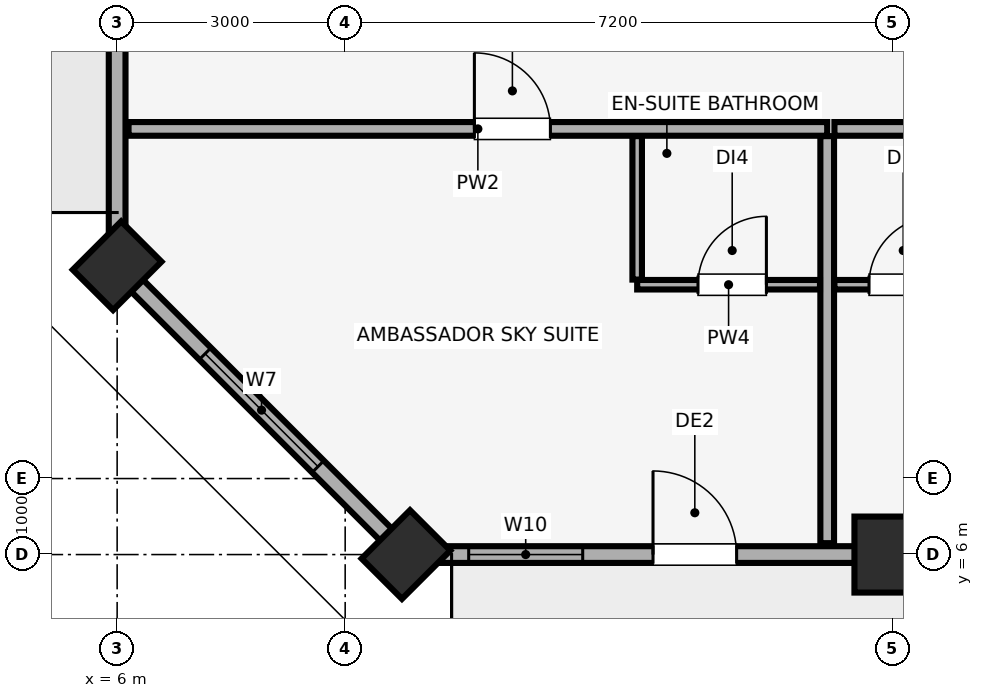
"""IFC4 building model, lengths in metres.
Left out: names, types, materials, properties, quantities, classifications, styles, units other than length and angle.
Written with IfcOpenShell. Run it as: python <this file> out.ifc"""

import sys

from ifc_helpers import new_model, si_unit, direction, frame, frame_2d, origin, origin_2d, place, context, subcontext, project, spatial, rectangle, extrude, element, fill, save


model = new_model("IFC4")
c1 = context("Model", 3, precision=1e-05, world=origin(), true_north=direction((0.0, 1.0)))
c2 = subcontext(c1, "Body", "Model", "MODEL_VIEW")
j1 = project(units=[si_unit("LENGTHUNIT", "METRE"), si_unit("PLANEANGLEUNIT", "RADIAN")], contexts=[c1])
p1 = place(None, origin())
s1 = spatial("IfcSite", under=j1, at=p1, CompositionType="ELEMENT")
p2 = place(p1, origin())
s2 = spatial("IfcBuilding", under=s1, at=p2, CompositionType="ELEMENT")
p3 = place(p2, frame((0.0, 0.0, 229.15)))
s3 = spatial("IfcBuildingStorey", under=s2, at=p3, CompositionType="ELEMENT", Elevation=229.15)
p4 = place(p3, frame((16.2, 6.0, 0.0), z_axis=(0.0, 0.0, 1.0), x_axis=(1.0, 0.0, 0.0)))
e1 = element("IfcColumn", 1, at=p4, inside=s3, PredefinedType="COLUMN", context=c2, shape_type="SweptSolid", body=[
    extrude(rectangle(XDim=1.0, YDim=1.0, at=origin_2d()), origin(), (0.0, 0.0, 1.0), 3.71),
])
for number, where, z_axis, x_axis in (
    (2, (9.8, 6.0, 0.0), (0.0, 0.0, 1.0), (0.707, 0.707, 0.0)),
    (3, (6.0, 9.8, 0.0), (0.0, 0.0, 1.0), (0.707, 0.707, 0.0)),
):
    element("IfcColumn", number, at=place(p3, frame(where, z_axis=z_axis, x_axis=x_axis)), inside=s3, PredefinedType="PILASTER", context=c2, shape_type="SweptSolid", body=[
        extrude(rectangle(XDim=0.9, YDim=0.75, at=origin_2d()), origin(), (0.0, 0.0, 1.0), 3.71),
    ])
p5 = place(p3, frame((9.8, 6.0, 0.0), z_axis=(0.0, 0.0, 1.0), x_axis=(1.0, 0.0, 0.0)))
e4 = element("IfcWall", 4, at=p5, inside=s3, PredefinedType="SOLIDWALL", context=c2, shape_type="SweptSolid", body=[
    extrude(rectangle(XDim=64.4, YDim=0.22, at=frame_2d((32.2, 0.0))), origin(), (0.0, 0.0, 1.0), 2.91),
])
p6 = place(p5, frame((3.25, 0.0, 0.0)))
e5 = element("IfcOpeningElement", 5, at=p6, cuts=e4, PredefinedType="OPENING", context=c2, shape_type="SweptSolid", body=[
    extrude(rectangle(XDim=1.1, YDim=2.15, at=frame_2d((0.55, 1.075))), frame((0.0, 0.12, 0.0), z_axis=(0.0, -1.0, 0.0), x_axis=(1.0, 0.0, 0.0)), (0.0, 0.0, 1.0), 0.24),
])
p7 = place(p5, frame((24.45, 0.0, 0.0)))
e6 = element("IfcOpeningElement", 6, at=p7, cuts=e4, PredefinedType="OPENING", context=c2, shape_type="SweptSolid", body=[
    extrude(rectangle(XDim=1.1, YDim=2.15, at=frame_2d((0.55, 1.075))), frame((0.0, 0.12, 0.0), z_axis=(0.0, -1.0, 0.0), x_axis=(1.0, 0.0, 0.0)), (0.0, 0.0, 1.0), 0.24),
])
p8 = place(p5, frame((45.65, 0.0, 0.0)))
e7 = element("IfcOpeningElement", 7, at=p8, cuts=e4, PredefinedType="OPENING", context=c2, shape_type="SweptSolid", body=[
    extrude(rectangle(XDim=1.1, YDim=2.15, at=frame_2d((0.55, 1.075))), frame((0.0, 0.12, 0.0), z_axis=(0.0, -1.0, 0.0), x_axis=(1.0, 0.0, 0.0)), (0.0, 0.0, 1.0), 0.24),
])
p9 = place(p5, frame((0.825, 0.0, 0.85)))
e8 = element("IfcOpeningElement", 8, at=p9, cuts=e4, PredefinedType="OPENING", context=c2, shape_type="SweptSolid", body=[
    extrude(rectangle(XDim=1.5, YDim=1.4, at=frame_2d((0.75, 0.7))), frame((0.0, 0.12, 0.0), z_axis=(0.0, -1.0, 0.0), x_axis=(1.0, 0.0, 0.0)), (0.0, 0.0, 1.0), 0.24),
])
p10 = place(p5, frame((7.217, 0.0, 0.85)))
e9 = element("IfcOpeningElement", 9, at=p10, cuts=e4, PredefinedType="OPENING", context=c2, shape_type="SweptSolid", body=[
    extrude(rectangle(XDim=3.2, YDim=1.85, at=frame_2d((1.6, 0.925))), frame((0.0, 0.12, 0.0), z_axis=(0.0, -1.0, 0.0), x_axis=(1.0, 0.0, 0.0)), (0.0, 0.0, 1.0), 0.24),
])
p11 = place(p5, frame((11.267, 0.0, 0.85)))
e10 = element("IfcOpeningElement", 10, at=p11, cuts=e4, PredefinedType="OPENING", context=c2, shape_type="SweptSolid", body=[
    extrude(rectangle(XDim=1.5, YDim=1.4, at=frame_2d((0.75, 0.7))), frame((0.0, 0.12, 0.0), z_axis=(0.0, -1.0, 0.0), x_axis=(1.0, 0.0, 0.0)), (0.0, 0.0, 1.0), 0.24),
])
p12 = place(p5, frame((16.663, 0.0, 0.85)))
e11 = element("IfcOpeningElement", 11, at=p12, cuts=e4, PredefinedType="OPENING", context=c2, shape_type="SweptSolid", body=[
    extrude(rectangle(XDim=3.2, YDim=1.85, at=frame_2d((1.6, 0.925))), frame((0.0, 0.12, 0.0), z_axis=(0.0, -1.0, 0.0), x_axis=(1.0, 0.0, 0.0)), (0.0, 0.0, 1.0), 0.24),
])
p13 = place(p5, frame((22.098, 0.0, 0.85)))
e12 = element("IfcOpeningElement", 12, at=p13, cuts=e4, PredefinedType="OPENING", context=c2, shape_type="SweptSolid", body=[
    extrude(rectangle(XDim=1.5, YDim=1.4, at=frame_2d((0.75, 0.7))), frame((0.0, 0.12, 0.0), z_axis=(0.0, -1.0, 0.0), x_axis=(1.0, 0.0, 0.0)), (0.0, 0.0, 1.0), 0.24),
])
p14 = place(p5, frame((29.0, 0.0, 0.85)))
e13 = element("IfcOpeningElement", 13, at=p14, cuts=e4, PredefinedType="OPENING", context=c2, shape_type="SweptSolid", body=[
    extrude(rectangle(XDim=2.4, YDim=1.5, at=frame_2d((1.2, 0.75))), frame((0.0, 0.12, 0.0), z_axis=(0.0, -1.0, 0.0), x_axis=(1.0, 0.0, 0.0)), (0.0, 0.0, 1.0), 0.24),
])
p15 = place(p5, frame((32.4, 0.0, 0.85)))
e14 = element("IfcOpeningElement", 14, at=p15, cuts=e4, PredefinedType="OPENING", context=c2, shape_type="SweptSolid", body=[
    extrude(rectangle(XDim=3.2, YDim=1.85, at=frame_2d((1.6, 0.925))), frame((0.0, 0.12, 0.0), z_axis=(0.0, -1.0, 0.0), x_axis=(1.0, 0.0, 0.0)), (0.0, 0.0, 1.0), 0.24),
])
p16 = place(p5, frame((38.138, 0.0, 0.85)))
e15 = element("IfcOpeningElement", 15, at=p16, cuts=e4, PredefinedType="OPENING", context=c2, shape_type="SweptSolid", body=[
    extrude(rectangle(XDim=3.6, YDim=1.75, at=frame_2d((1.8, 0.875))), frame((0.0, 0.12, 0.0), z_axis=(0.0, -1.0, 0.0), x_axis=(1.0, 0.0, 0.0)), (0.0, 0.0, 1.0), 0.24),
])
p17 = place(p5, frame((48.387, 0.0, 0.85)))
e16 = element("IfcOpeningElement", 16, at=p17, cuts=e4, PredefinedType="OPENING", context=c2, shape_type="SweptSolid", body=[
    extrude(rectangle(XDim=1.5, YDim=1.4, at=frame_2d((0.75, 0.7))), frame((0.0, 0.12, 0.0), z_axis=(0.0, -1.0, 0.0), x_axis=(1.0, 0.0, 0.0)), (0.0, 0.0, 1.0), 0.24),
])
p18 = place(p5, frame((53.583, 0.0, 0.85)))
e17 = element("IfcOpeningElement", 17, at=p18, cuts=e4, PredefinedType="OPENING", context=c2, shape_type="SweptSolid", body=[
    extrude(rectangle(XDim=3.6, YDim=1.75, at=frame_2d((1.8, 0.875))), frame((0.0, 0.12, 0.0), z_axis=(0.0, -1.0, 0.0), x_axis=(1.0, 0.0, 0.0)), (0.0, 0.0, 1.0), 0.24),
])
p19 = place(p5, frame((59.695, 0.0, 0.85)))
e18 = element("IfcOpeningElement", 18, at=p19, cuts=e4, PredefinedType="OPENING", context=c2, shape_type="SweptSolid", body=[
    extrude(rectangle(XDim=3.6, YDim=1.75, at=frame_2d((1.8, 0.875))), frame((0.0, 0.12, 0.0), z_axis=(0.0, -1.0, 0.0), x_axis=(1.0, 0.0, 0.0)), (0.0, 0.0, 1.0), 0.24),
])
p20 = place(p3, frame((6.0, 45.2, 0.0), z_axis=(0.0, 0.0, 1.0), x_axis=(0.0, -1.0, 0.0)))
e19 = element("IfcWall", 19, at=p20, inside=s3, PredefinedType="SOLIDWALL", context=c2, shape_type="SweptSolid", body=[
    extrude(rectangle(XDim=35.4, YDim=0.22, at=frame_2d((17.7, 0.0))), origin(), (0.0, 0.0, 1.0), 2.91),
])
p21 = place(p20, frame((22.3, 0.0, 0.0)))
e20 = element("IfcOpeningElement", 20, at=p21, cuts=e19, PredefinedType="OPENING", context=c2, shape_type="SweptSolid", body=[
    extrude(rectangle(XDim=1.4, YDim=2.2, at=frame_2d((0.7, 1.1))), frame((0.0, 0.12, 0.0), z_axis=(0.0, -1.0, 0.0), x_axis=(1.0, 0.0, 0.0)), (0.0, 0.0, 1.0), 0.24),
])
p22 = place(p20, frame((25.06, 0.0, 0.85)))
e21 = element("IfcOpeningElement", 21, at=p22, cuts=e19, PredefinedType="OPENING", context=c2, shape_type="SweptSolid", body=[
    extrude(rectangle(XDim=3.6, YDim=1.65, at=frame_2d((1.8, 0.825))), frame((0.0, 0.12, 0.0), z_axis=(0.0, -1.0, 0.0), x_axis=(1.0, 0.0, 0.0)), (0.0, 0.0, 1.0), 0.24),
])
p23 = place(p20, frame((17.34, 0.0, 0.85)))
e22 = element("IfcOpeningElement", 22, at=p23, cuts=e19, PredefinedType="OPENING", context=c2, shape_type="SweptSolid", body=[
    extrude(rectangle(XDim=3.6, YDim=1.65, at=frame_2d((1.8, 0.825))), frame((0.0, 0.12, 0.0), z_axis=(0.0, -1.0, 0.0), x_axis=(1.0, 0.0, 0.0)), (0.0, 0.0, 1.0), 0.24),
])
p24 = place(p20, frame((11.585, 0.0, 0.85)))
e23 = element("IfcOpeningElement", 23, at=p24, cuts=e19, PredefinedType="OPENING", context=c2, shape_type="SweptSolid", body=[
    extrude(rectangle(XDim=3.0, YDim=1.5, at=frame_2d((1.5, 0.75))), frame((0.0, 0.12, 0.0), z_axis=(0.0, -1.0, 0.0), x_axis=(1.0, 0.0, 0.0)), (0.0, 0.0, 1.0), 0.24),
])
p25 = place(p20, frame((6.815, 0.0, 0.85)))
e24 = element("IfcOpeningElement", 24, at=p25, cuts=e19, PredefinedType="OPENING", context=c2, shape_type="SweptSolid", body=[
    extrude(rectangle(XDim=3.0, YDim=1.5, at=frame_2d((1.5, 0.75))), frame((0.0, 0.12, 0.0), z_axis=(0.0, -1.0, 0.0), x_axis=(1.0, 0.0, 0.0)), (0.0, 0.0, 1.0), 0.24),
])
p26 = place(p20, frame((0.885, 0.0, 0.85)))
e25 = element("IfcOpeningElement", 25, at=p26, cuts=e19, PredefinedType="OPENING", context=c2, shape_type="SweptSolid", body=[
    extrude(rectangle(XDim=3.6, YDim=1.65, at=frame_2d((1.8, 0.825))), frame((0.0, 0.12, 0.0), z_axis=(0.0, -1.0, 0.0), x_axis=(1.0, 0.0, 0.0)), (0.0, 0.0, 1.0), 0.24),
])
p27 = place(p3, frame((6.0, 9.8, 0.0), z_axis=(0.0, 0.0, 1.0), x_axis=(0.707106781187, -0.707106781187, 0.0)))
e26 = element("IfcWall", 26, at=p27, inside=s3, PredefinedType="SOLIDWALL", context=c2, shape_type="SweptSolid", body=[
    extrude(rectangle(XDim=5.374, YDim=0.22, at=frame_2d((2.687, 0.0))), origin(), (0.0, 0.0, 1.0), 2.91),
])
p28 = place(p27, frame((1.637, 0.0, 0.85)))
e27 = element("IfcOpeningElement", 27, at=p28, cuts=e26, PredefinedType="OPENING", context=c2, shape_type="SweptSolid", body=[
    extrude(rectangle(XDim=2.1, YDim=1.6, at=frame_2d((1.05, 0.8))), frame((0.0, 0.12, 0.0), z_axis=(0.0, -1.0, 0.0), x_axis=(1.0, 0.0, 0.0)), (0.0, 0.0, 1.0), 0.24),
])
p29 = place(p3, frame((6.15, 11.6, 0.0), z_axis=(0.0, 0.0, 1.0), x_axis=(1.0, 0.0, 0.0)))
e28 = element("IfcWall", 28, at=p29, inside=s3, PredefinedType="PARTITIONING", context=c2, shape_type="SweptSolid", body=[
    extrude(rectangle(XDim=9.192, YDim=0.18, at=frame_2d((4.596, 0.0))), origin(), (0.0, 0.0, 1.0), 3.71),
])
p30 = place(p29, frame((4.55, 0.0, 0.0)))
e29 = element("IfcOpeningElement", 29, at=p30, cuts=e28, PredefinedType="OPENING", context=c2, shape_type="SweptSolid", body=[
    extrude(rectangle(XDim=1.0, YDim=2.15, at=frame_2d((0.5, 1.075))), frame((0.0, 0.1, 0.0), z_axis=(0.0, -1.0, 0.0), x_axis=(1.0, 0.0, 0.0)), (0.0, 0.0, 1.0), 0.2),
])
p31 = place(p3, frame((15.342, 6.15, 0.0), z_axis=(0.0, 0.0, 1.0), x_axis=(0.0, 1.0, 0.0)))
e30 = element("IfcWall", 30, at=p31, inside=s3, PredefinedType="PARTITIONING", context=c2, shape_type="SweptSolid", body=[
    extrude(rectangle(XDim=5.355, YDim=0.18, at=frame_2d((2.677, 0.0))), origin(), (0.0, 0.0, 1.0), 3.08),
])
p32 = place(p3, frame((12.842, 9.55, 0.0), z_axis=(0.0, 0.0, 1.0), x_axis=(1.0, 0.0, 0.0)))
e31 = element("IfcWall", 31, at=p32, inside=s3, PredefinedType="PARTITIONING", context=c2, shape_type="SweptSolid", body=[
    extrude(rectangle(XDim=2.405, YDim=0.125, at=frame_2d((1.202, 0.0))), origin(), (0.0, 0.0, 1.0), 3.71),
])
p33 = place(p32, frame((0.8, 0.0, 0.0)))
e32 = element("IfcOpeningElement", 32, at=p33, cuts=e31, PredefinedType="OPENING", context=c2, shape_type="SweptSolid", body=[
    extrude(rectangle(XDim=0.9, YDim=2.1, at=frame_2d((0.45, 1.05))), frame((0.0, 0.073, 0.0), z_axis=(0.0, -1.0, 0.0), x_axis=(1.0, 0.0, 0.0)), (0.0, 0.0, 1.0), 0.145),
])
p34 = place(p3, frame((12.842, 9.617, 0.0), z_axis=(0.0, 0.0, 1.0), x_axis=(0.0, 1.0, 0.0)))
e33 = element("IfcWall", 33, at=p34, inside=s3, PredefinedType="PARTITIONING", context=c2, shape_type="SweptSolid", body=[
    extrude(rectangle(XDim=1.887, YDim=0.125, at=frame_2d((0.944, 0.0))), origin(), (0.0, 0.0, 1.0), 3.71),
])
p35 = place(p3, frame((15.437, 11.6, 0.0), z_axis=(0.0, 0.0, 1.0), x_axis=(1.0, 0.0, 0.0)))
e34 = element("IfcWall", 34, at=p35, inside=s3, PredefinedType="PARTITIONING", context=c2, shape_type="SweptSolid", body=[
    extrude(rectangle(XDim=5.197, YDim=0.18, at=frame_2d((2.598, 0.0))), origin(), (0.0, 0.0, 1.0), 3.71),
])
p36 = place(p35, frame((3.501, 0.0, 0.0)))
e35 = element("IfcOpeningElement", 35, at=p36, cuts=e34, PredefinedType="OPENING", context=c2, shape_type="SweptSolid", body=[
    extrude(rectangle(XDim=1.0, YDim=2.15, at=frame_2d((0.5, 1.075))), frame((0.0, 0.1, 0.0), z_axis=(0.0, -1.0, 0.0), x_axis=(1.0, 0.0, 0.0)), (0.0, 0.0, 1.0), 0.2),
])
p37 = place(p3, frame((15.437, 9.55, 0.0), z_axis=(0.0, 0.0, 1.0), x_axis=(1.0, 0.0, 0.0)))
e36 = element("IfcWall", 36, at=p37, inside=s3, PredefinedType="PARTITIONING", context=c2, shape_type="SweptSolid", body=[
    extrude(rectangle(XDim=1.905, YDim=0.125, at=frame_2d((0.953, 0.0))), origin(), (0.0, 0.0, 1.0), 3.71),
])
p38 = place(p37, frame((0.455, 0.0, 0.0)))
e37 = element("IfcOpeningElement", 37, at=p38, cuts=e36, PredefinedType="OPENING", context=c2, shape_type="SweptSolid", body=[
    extrude(rectangle(XDim=0.9, YDim=2.1, at=frame_2d((0.45, 1.05))), frame((0.0, 0.073, 0.0), z_axis=(0.0, -1.0, 0.0), x_axis=(1.0, 0.0, 0.0)), (0.0, 0.0, 1.0), 0.145),
])
p39 = place(p28, origin())
e38 = element("IfcWindow", 38, at=p39, inside=s3, PartitioningType="SINGLE_PANEL", PredefinedType="WINDOW", context=c2, shape_type="SweptSolid", body=[
    extrude(rectangle(XDim=2.1, YDim=1.6, at=frame_2d((1.05, 0.8))), frame((0.0, 0.03, 0.0), z_axis=(0.0, -1.0, 0.0), x_axis=(1.0, 0.0, 0.0)), (0.0, 0.0, 1.0), 0.06),
])
fill(e27, e38)
p40 = place(p6, origin())
e39 = element("IfcDoor", 39, at=p40, inside=s3, OperationType="SINGLE_SWING_LEFT", PredefinedType="DOOR", context=c2, shape_type="SweptSolid", body=[
    extrude(rectangle(XDim=1.1, YDim=2.15, at=frame_2d((0.55, 1.075))), frame((0.0, 0.025, 0.0), z_axis=(0.0, -1.0, 0.0), x_axis=(1.0, 0.0, 0.0)), (0.0, 0.0, 1.0), 0.05),
])
fill(e5, e39)
p41 = place(p9, origin())
e40 = element("IfcWindow", 40, at=p41, inside=s3, PartitioningType="SINGLE_PANEL", PredefinedType="WINDOW", context=c2, shape_type="SweptSolid", body=[
    extrude(rectangle(XDim=1.5, YDim=1.4, at=frame_2d((0.75, 0.7))), frame((0.0, 0.03, 0.0), z_axis=(0.0, -1.0, 0.0), x_axis=(1.0, 0.0, 0.0)), (0.0, 0.0, 1.0), 0.06),
])
fill(e8, e40)
p42 = place(p30, origin())
e41 = element("IfcDoor", 41, at=p42, inside=s3, OperationType="SINGLE_SWING_LEFT", PredefinedType="DOOR", context=c2, shape_type="SweptSolid", body=[
    extrude(rectangle(XDim=1.0, YDim=2.15, at=frame_2d((0.5, 1.075))), frame((0.0, 0.025, 0.0), z_axis=(0.0, -1.0, 0.0), x_axis=(1.0, 0.0, 0.0)), (0.0, 0.0, 1.0), 0.05),
])
fill(e29, e41)
p43 = place(p33, origin())
e42 = element("IfcDoor", 42, at=p43, inside=s3, OperationType="SINGLE_SWING_RIGHT", PredefinedType="DOOR", context=c2, shape_type="SweptSolid", body=[
    extrude(rectangle(XDim=0.9, YDim=2.1, at=frame_2d((0.45, 1.05))), frame((0.0, 0.025, 0.0), z_axis=(0.0, -1.0, 0.0), x_axis=(1.0, 0.0, 0.0)), (0.0, 0.0, 1.0), 0.05),
])
fill(e32, e42)
p44 = place(p38, origin())
e43 = element("IfcDoor", 43, at=p44, inside=s3, OperationType="SINGLE_SWING_RIGHT", PredefinedType="DOOR", context=c2, shape_type="SweptSolid", body=[
    extrude(rectangle(XDim=0.9, YDim=2.1, at=frame_2d((0.45, 1.05))), frame((0.0, 0.025, 0.0), z_axis=(0.0, -1.0, 0.0), x_axis=(1.0, 0.0, 0.0)), (0.0, 0.0, 1.0), 0.05),
])
fill(e37, e43)
save(model, sys.argv[1])
